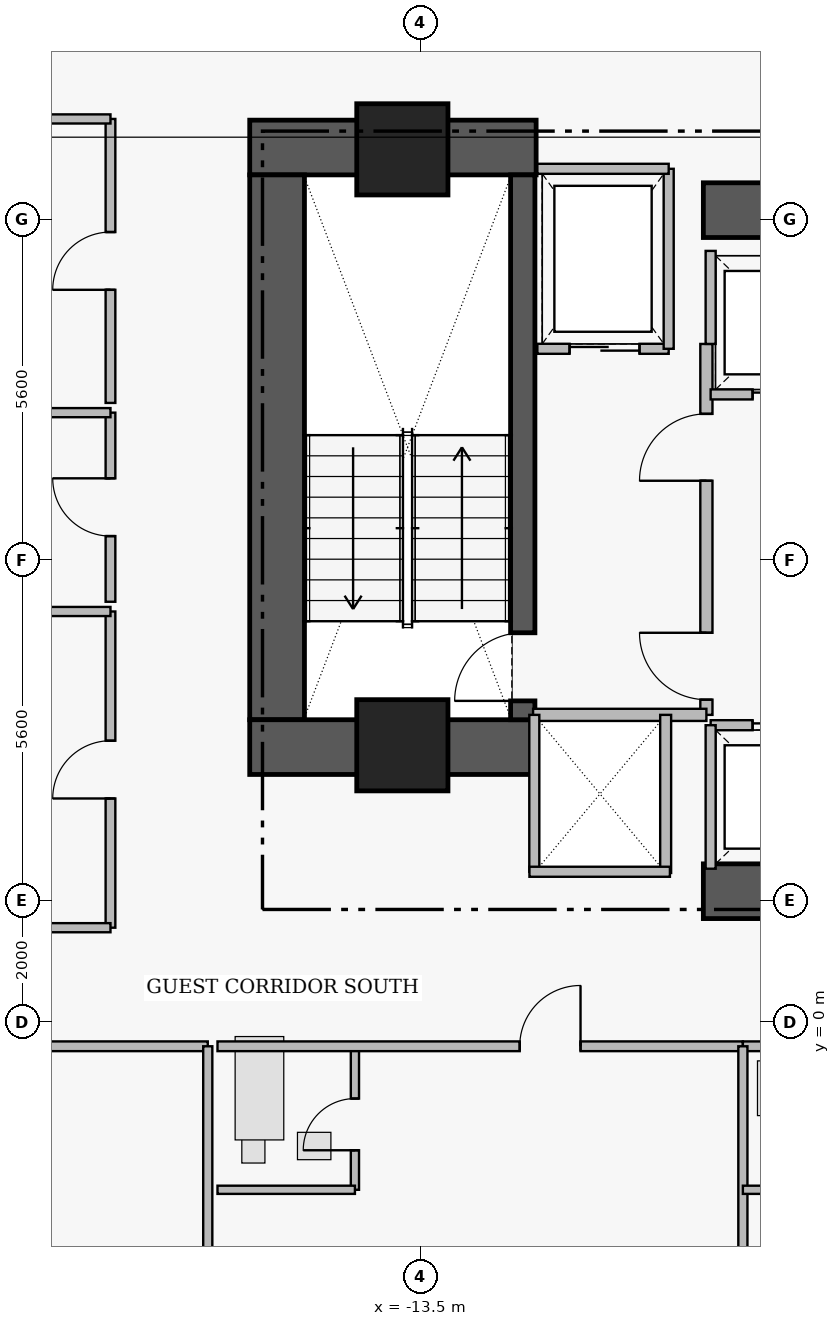
"""IFC4 building model, lengths in metres.
Left out: names, types, materials, properties, quantities, classifications, styles, units other than length and angle.
Written with IfcOpenShell. Run it as: python <this file> out.ifc"""

import sys

from ifc_helpers import new_model, si_unit, direction, frame, frame_2d, origin, origin_2d, place, context, subcontext, project, spatial, rectangle, extrude, element, fill, save


model = new_model("IFC4")
c1 = context("Model", 3, precision=1e-05, world=origin(), true_north=direction((0.0, 1.0)))
c2 = subcontext(c1, "Body", "Model", "MODEL_VIEW")
j1 = project(units=[si_unit("LENGTHUNIT", "METRE"), si_unit("PLANEANGLEUNIT", "RADIAN")], contexts=[c1])
p1 = place(None, origin())
s1 = spatial("IfcSite", under=j1, at=p1, CompositionType="ELEMENT")
p2 = place(p1, origin())
s2 = spatial("IfcBuilding", under=s1, at=p2, CompositionType="ELEMENT")
p3 = place(p2, frame((0.0, 0.0, 38.55)))
s3 = spatial("IfcBuildingStorey", under=s2, at=p3, CompositionType="ELEMENT", Elevation=38.55)
p4 = place(p3, frame((-16.31, 14.38, 0.0), z_axis=(0.0, 0.0, 1.0), x_axis=(1.0, 0.0, 0.0)))
e1 = element("IfcWall", 1, at=p4, inside=s3, PredefinedType="SHEAR", context=c2, shape_type="SweptSolid", body=[
    extrude(rectangle(XDim=4.71, YDim=0.9, at=frame_2d((2.355, 0.0))), origin(), (0.0, 0.0, 1.0), 3.46),
])
p5 = place(p3, frame((-15.86, 4.97, 0.0), z_axis=(0.0, 0.0, 1.0), x_axis=(0.0, 1.0, 0.0)))
e2 = element("IfcWall", 2, at=p5, inside=s3, PredefinedType="SHEAR", context=c2, shape_type="SweptSolid", body=[
    extrude(rectangle(XDim=8.96, YDim=0.9, at=frame_2d((4.48, 0.0))), origin(), (0.0, 0.0, 1.0), 3.46),
])
p6 = place(p3, frame((-16.31, 4.52, 0.0), z_axis=(0.0, 0.0, 1.0), x_axis=(1.0, 0.0, 0.0)))
e3 = element("IfcWall", 3, at=p6, inside=s3, PredefinedType="SHEAR", context=c2, shape_type="SweptSolid", body=[
    extrude(rectangle(XDim=4.71, YDim=0.9, at=frame_2d((2.355, 0.0))), origin(), (0.0, 0.0, 1.0), 3.46),
])
for number, where, z_axis, x_axis in (
    (4, (-8.85, 2.15, 0.0), (0.0, 0.0, 1.0), (1.0, 0.0, 0.0)),
    (5, (-8.85, 13.35, 0.0), (0.0, 0.0, 1.0), (1.0, 0.0, 0.0)),
):
    element("IfcWall", number, at=place(p3, frame(where, z_axis=z_axis, x_axis=x_axis)), inside=s3, PredefinedType="SHEAR", context=c2, shape_type="SweptSolid", body=[
        extrude(rectangle(XDim=7.6, YDim=0.9, at=frame_2d((3.8, 0.0))), origin(), (0.0, 0.0, 1.0), 3.43),
    ])
p7 = place(p3, frame((-11.82, 4.97, 0.0), z_axis=(0.0, 0.0, 1.0), x_axis=(0.0, 1.0, 0.0)))
e6 = element("IfcWall", 6, at=p7, inside=s3, PredefinedType="SHEAR", context=c2, shape_type="SweptSolid", body=[
    extrude(rectangle(XDim=8.96, YDim=0.4, at=frame_2d((4.48, 0.0))), origin(), (0.0, 0.0, 1.0), 3.46),
])
p8 = place(p7, frame((0.31, 0.0, 0.0)))
e7 = element("IfcOpeningElement", 7, at=p8, cuts=e6, PredefinedType="OPENING", context=c2, shape_type="SweptSolid", body=[
    extrude(rectangle(XDim=1.12, YDim=2.22, at=frame_2d((0.56, 1.11))), frame((0.0, 0.21, 0.0), z_axis=(0.0, -1.0, 0.0), x_axis=(1.0, 0.0, 0.0)), (0.0, 0.0, 1.0), 0.42),
])
for number, where, z_axis, x_axis in (
    (8, (-13.8, 14.35, 0.0), (0.0, 0.0, 1.0), (1.0, 0.0, 0.0)),
    (9, (-13.8, 4.55, 0.0), (0.0, 0.0, 1.0), (1.0, 0.0, 0.0)),
):
    element("IfcColumn", number, at=place(p3, frame(where, z_axis=z_axis, x_axis=x_axis)), inside=s3, PredefinedType="COLUMN", context=c2, shape_type="SweptSolid", body=[
        extrude(rectangle(XDim=1.5, YDim=1.5, at=origin_2d()), origin(), (0.0, 0.0, 1.0), 3.65),
    ])
p9 = place(p3, frame((-8.8, 5.05, 0.0), z_axis=(0.0, 0.0, 1.0), x_axis=(0.0, 1.0, 0.0)))
e10 = element("IfcWall", 10, at=p9, inside=s3, PredefinedType="PARTITIONING", context=c2, shape_type="SweptSolid", body=[
    extrude(rectangle(XDim=6.1, YDim=0.2, at=frame_2d((3.05, 0.0))), origin(), (0.0, 0.0, 1.0), 3.43),
])
p10 = place(p9, frame((0.25, 0.0, 0.0)))
e11 = element("IfcOpeningElement", 11, at=p10, cuts=e10, PredefinedType="OPENING", context=c2, shape_type="SweptSolid", body=[
    extrude(rectangle(XDim=1.1, YDim=2.2, at=frame_2d((0.55, 1.1))), frame((0.0, 0.11, 0.0), z_axis=(0.0, -1.0, 0.0), x_axis=(1.0, 0.0, 0.0)), (0.0, 0.0, 1.0), 0.22),
])
p11 = place(p9, frame((3.85, 0.0, 0.0)))
e12 = element("IfcOpeningElement", 12, at=p11, cuts=e10, PredefinedType="OPENING", context=c2, shape_type="SweptSolid", body=[
    extrude(rectangle(XDim=1.1, YDim=2.2, at=frame_2d((0.55, 1.1))), frame((0.0, 0.11, 0.0), z_axis=(0.0, -1.0, 0.0), x_axis=(1.0, 0.0, 0.0)), (0.0, 0.0, 1.0), 0.22),
])
p12 = place(p3, frame((-11.58, 11.07, 0.0), z_axis=(0.0, 0.0, 1.0), x_axis=(1.0, 0.0, 0.0)))
e13 = element("IfcWall", 13, at=p12, inside=s3, PredefinedType="PARTITIONING", context=c2, shape_type="SweptSolid", body=[
    extrude(rectangle(XDim=2.16, YDim=0.165, at=frame_2d((1.08, 0.0))), origin(), (0.0, 0.0, 1.0), 3.43),
])
p13 = place(p12, frame((0.53, 0.0, 0.0)))
e14 = element("IfcOpeningElement", 14, at=p13, cuts=e13, PredefinedType="OPENING", context=c2, shape_type="SweptSolid", body=[
    extrude(rectangle(XDim=1.15, YDim=2.25, at=frame_2d((0.575, 1.125))), frame((0.0, 0.093, 0.0), z_axis=(0.0, -1.0, 0.0), x_axis=(1.0, 0.0, 0.0)), (0.0, 0.0, 1.0), 0.185),
])
p14 = place(p3, frame((-8.73, 4.88, 0.0), z_axis=(0.0, 0.0, 1.0), x_axis=(1.0, 0.0, 0.0)))
e15 = element("IfcWall", 15, at=p14, inside=s3, PredefinedType="PARTITIONING", context=c2, shape_type="SweptSolid", body=[
    extrude(rectangle(XDim=2.48, YDim=0.165, at=frame_2d((1.24, 0.0))), origin(), (0.0, 0.0, 1.0), 3.43),
])
p15 = place(p14, frame((0.69, 0.0, 0.0)))
e16 = element("IfcOpeningElement", 16, at=p15, cuts=e15, PredefinedType="OPENING", context=c2, shape_type="SweptSolid", body=[
    extrude(rectangle(XDim=1.1, YDim=2.25, at=frame_2d((0.55, 1.125))), frame((0.0, 0.093, 0.0), z_axis=(0.0, -1.0, 0.0), x_axis=(1.0, 0.0, 0.0)), (0.0, 0.0, 1.0), 0.185),
])
p16 = place(p3, frame((-8.73, 10.32, 0.0), z_axis=(0.0, 0.0, 1.0), x_axis=(1.0, 0.0, 0.0)))
e17 = element("IfcWall", 17, at=p16, inside=s3, PredefinedType="PARTITIONING", context=c2, shape_type="SweptSolid", body=[
    extrude(rectangle(XDim=2.48, YDim=0.165, at=frame_2d((1.24, 0.0))), origin(), (0.0, 0.0, 1.0), 3.43),
])
p17 = place(p16, frame((0.69, 0.0, 0.0)))
e18 = element("IfcOpeningElement", 18, at=p17, cuts=e17, PredefinedType="OPENING", context=c2, shape_type="SweptSolid", body=[
    extrude(rectangle(XDim=1.1, YDim=2.25, at=frame_2d((0.55, 1.125))), frame((0.0, 0.093, 0.0), z_axis=(0.0, -1.0, 0.0), x_axis=(1.0, 0.0, 0.0)), (0.0, 0.0, 1.0), 0.185),
])
p18 = place(p3, frame((-25.64, -0.4, 0.0), z_axis=(0.0, 0.0, 1.0), x_axis=(1.0, 0.0, 0.0)))
e19 = element("IfcWall", 19, at=p18, inside=s3, PredefinedType="PARTITIONING", context=c2, shape_type="SweptSolid", body=[
    extrude(rectangle(XDim=8.64, YDim=0.16, at=frame_2d((4.32, 0.0))), origin(), (0.0, 0.0, 1.0), 3.43),
])
p19 = place(p18, frame((4.97, 0.0, 0.0)))
e20 = element("IfcOpeningElement", 20, at=p19, cuts=e19, PredefinedType="OPENING", context=c2, shape_type="SweptSolid", body=[
    extrude(rectangle(XDim=1.0, YDim=2.15, at=frame_2d((0.5, 1.075))), frame((0.0, 0.09, 0.0), z_axis=(0.0, -1.0, 0.0), x_axis=(1.0, 0.0, 0.0)), (0.0, 0.0, 1.0), 0.18),
])
p20 = place(p3, frame((-14.58, -2.76, 0.0), z_axis=(0.0, 0.0, 1.0), x_axis=(0.0, 1.0, 0.0)))
e21 = element("IfcWall", 21, at=p20, inside=s3, PredefinedType="PLUMBINGWALL", context=c2, shape_type="SweptSolid", body=[
    extrude(rectangle(XDim=2.36, YDim=0.135, at=frame_2d((1.18, 0.0))), origin(), (0.0, 0.0, 1.0), 3.43),
])
p21 = place(p20, frame((0.65, 0.0, 0.0)))
e22 = element("IfcOpeningElement", 22, at=p21, cuts=e21, PredefinedType="OPENING", context=c2, shape_type="SweptSolid", body=[
    extrude(rectangle(XDim=0.85, YDim=2.1, at=frame_2d((0.425, 1.05))), frame((0.0, 0.077, 0.0), z_axis=(0.0, -1.0, 0.0), x_axis=(1.0, 0.0, 0.0)), (0.0, 0.0, 1.0), 0.155),
])
p22 = place(p3, frame((-16.84, -0.4, 0.0), z_axis=(0.0, 0.0, 1.0), x_axis=(1.0, 0.0, 0.0)))
e23 = element("IfcWall", 23, at=p22, inside=s3, PredefinedType="PARTITIONING", context=c2, shape_type="SweptSolid", body=[
    extrude(rectangle(XDim=8.64, YDim=0.16, at=frame_2d((4.32, 0.0))), origin(), (0.0, 0.0, 1.0), 3.43),
])
p23 = place(p22, frame((4.97, 0.0, 0.0)))
e24 = element("IfcOpeningElement", 24, at=p23, cuts=e23, PredefinedType="OPENING", context=c2, shape_type="SweptSolid", body=[
    extrude(rectangle(XDim=1.0, YDim=2.15, at=frame_2d((0.5, 1.075))), frame((0.0, 0.09, 0.0), z_axis=(0.0, -1.0, 0.0), x_axis=(1.0, 0.0, 0.0)), (0.0, 0.0, 1.0), 0.18),
])
p24 = place(p3, frame((-8.2, -0.4, 0.0), z_axis=(0.0, 0.0, 1.0), x_axis=(1.0, 0.0, 0.0)))
e25 = element("IfcWall", 25, at=p24, inside=s3, PredefinedType="PARTITIONING", context=c2, shape_type="SweptSolid", body=[
    extrude(rectangle(XDim=5.22, YDim=0.16, at=frame_2d((2.61, 0.0))), origin(), (0.0, 0.0, 1.0), 3.43),
])
p25 = place(p24, frame((3.26, 0.0, 0.0)))
e26 = element("IfcOpeningElement", 26, at=p25, cuts=e25, PredefinedType="OPENING", context=c2, shape_type="SweptSolid", body=[
    extrude(rectangle(XDim=1.0, YDim=2.15, at=frame_2d((0.5, 1.075))), frame((0.0, 0.09, 0.0), z_axis=(0.0, -1.0, 0.0), x_axis=(1.0, 0.0, 0.0)), (0.0, 0.0, 1.0), 0.18),
])
p26 = place(p3, frame((-18.6, 1.55, 0.0), z_axis=(0.0, 0.0, 1.0), x_axis=(0.0, 1.0, 0.0)))
e27 = element("IfcWall", 27, at=p26, inside=s3, PredefinedType="PARTITIONING", context=c2, shape_type="SweptSolid", body=[
    extrude(rectangle(XDim=5.2, YDim=0.16, at=frame_2d((2.6, 0.0))), origin(), (0.0, 0.0, 1.0), 3.43),
])
p27 = place(p26, frame((2.125, 0.0, 0.0)))
e28 = element("IfcOpeningElement", 28, at=p27, cuts=e27, PredefinedType="OPENING", context=c2, shape_type="SweptSolid", body=[
    extrude(rectangle(XDim=0.95, YDim=2.15, at=frame_2d((0.475, 1.075))), frame((0.0, 0.09, 0.0), z_axis=(0.0, -1.0, 0.0), x_axis=(1.0, 0.0, 0.0)), (0.0, 0.0, 1.0), 0.18),
])
p28 = place(p3, frame((-18.6, 6.91, 0.0), z_axis=(0.0, 0.0, 1.0), x_axis=(0.0, 1.0, 0.0)))
e29 = element("IfcWall", 29, at=p28, inside=s3, PredefinedType="PARTITIONING", context=c2, shape_type="SweptSolid", body=[
    extrude(rectangle(XDim=3.11, YDim=0.16, at=frame_2d((1.555, 0.0))), origin(), (0.0, 0.0, 1.0), 3.43),
])
p29 = place(p28, frame((1.08, 0.0, 0.0)))
e30 = element("IfcOpeningElement", 30, at=p29, cuts=e29, PredefinedType="OPENING", context=c2, shape_type="SweptSolid", body=[
    extrude(rectangle(XDim=0.95, YDim=2.15, at=frame_2d((0.475, 1.075))), frame((0.0, 0.09, 0.0), z_axis=(0.0, -1.0, 0.0), x_axis=(1.0, 0.0, 0.0)), (0.0, 0.0, 1.0), 0.18),
])
p30 = place(p3, frame((-18.6, 10.18, 0.0), z_axis=(0.0, 0.0, 1.0), x_axis=(0.0, 1.0, 0.0)))
e31 = element("IfcWall", 31, at=p30, inside=s3, PredefinedType="PARTITIONING", context=c2, shape_type="SweptSolid", body=[
    extrude(rectangle(XDim=4.67, YDim=0.16, at=frame_2d((2.335, 0.0))), origin(), (0.0, 0.0, 1.0), 3.43),
])
p31 = place(p30, frame((1.86, 0.0, 0.0)))
e32 = element("IfcOpeningElement", 32, at=p31, cuts=e31, PredefinedType="OPENING", context=c2, shape_type="SweptSolid", body=[
    extrude(rectangle(XDim=0.95, YDim=2.15, at=frame_2d((0.475, 1.075))), frame((0.0, 0.09, 0.0), z_axis=(0.0, -1.0, 0.0), x_axis=(1.0, 0.0, 0.0)), (0.0, 0.0, 1.0), 0.18),
])
p32 = place(p3, frame((-11.65, 5.05, 0.0), z_axis=(0.0, 0.0, 1.0), x_axis=(1.0, 0.0, 0.0)))
e33 = element("IfcWall", 33, at=p32, inside=s3, PredefinedType="PARTITIONING", context=c2, shape_type="SweptSolid", body=[
    extrude(rectangle(XDim=2.85, YDim=0.2, at=frame_2d((1.425, 0.0))), origin(), (0.0, 0.0, 1.0), 3.43),
])
p33 = place(p3, frame((-9.42, 11.07, 0.0), z_axis=(0.0, 0.0, 1.0), x_axis=(0.0, 1.0, 0.0)))
e34 = element("IfcWall", 34, at=p33, inside=s3, PredefinedType="PARTITIONING", context=c2, shape_type="SweptSolid", body=[
    extrude(rectangle(XDim=2.96, YDim=0.165, at=frame_2d((1.48, 0.0))), origin(), (0.0, 0.0, 1.0), 3.43),
])
p34 = place(p3, frame((-11.58, 14.03, 0.0), z_axis=(0.0, 0.0, 1.0), x_axis=(1.0, 0.0, 0.0)))
e35 = element("IfcWall", 35, at=p34, inside=s3, PredefinedType="PARTITIONING", context=c2, shape_type="SweptSolid", body=[
    extrude(rectangle(XDim=2.16, YDim=0.165, at=frame_2d((1.08, 0.0))), origin(), (0.0, 0.0, 1.0), 3.43),
])
p35 = place(p3, frame((-8.73, 2.52, 0.0), z_axis=(0.0, 0.0, 1.0), x_axis=(0.0, 1.0, 0.0)))
e36 = element("IfcWall", 36, at=p35, inside=s3, PredefinedType="PARTITIONING", context=c2, shape_type="SweptSolid", body=[
    extrude(rectangle(XDim=2.36, YDim=0.165, at=frame_2d((1.18, 0.0))), origin(), (0.0, 0.0, 1.0), 3.43),
])
p36 = place(p3, frame((-8.73, 11.15, 0.0), z_axis=(0.0, 0.0, 1.0), x_axis=(0.0, 1.0, 0.0)))
e37 = element("IfcWall", 37, at=p36, inside=s3, PredefinedType="PARTITIONING", context=c2, shape_type="SweptSolid", body=[
    extrude(rectangle(XDim=1.53, YDim=0.165, at=frame_2d((0.765, 0.0))), origin(), (0.0, 0.0, 1.0), 3.43),
])
p37 = place(p3, frame((-9.47, 2.45, 0.0), z_axis=(0.0, 0.0, 1.0), x_axis=(0.0, 1.0, 0.0)))
e38 = element("IfcWall", 38, at=p37, inside=s3, PredefinedType="PARTITIONING", context=c2, shape_type="SweptSolid", body=[
    extrude(rectangle(XDim=2.6, YDim=0.18, at=frame_2d((1.3, 0.0))), origin(), (0.0, 0.0, 1.0), 3.43),
])
p38 = place(p3, frame((-11.63, 2.47, 0.0), z_axis=(0.0, 0.0, 1.0), x_axis=(0.0, 1.0, 0.0)))
e39 = element("IfcWall", 39, at=p38, inside=s3, PredefinedType="PARTITIONING", context=c2, shape_type="SweptSolid", body=[
    extrude(rectangle(XDim=2.58, YDim=0.165, at=frame_2d((1.29, 0.0))), origin(), (0.0, 0.0, 1.0), 3.43),
])
p39 = place(p3, frame((-11.71, 2.47, 0.0), z_axis=(0.0, 0.0, 1.0), x_axis=(1.0, 0.0, 0.0)))
e40 = element("IfcWall", 40, at=p39, inside=s3, PredefinedType="PARTITIONING", context=c2, shape_type="SweptSolid", body=[
    extrude(rectangle(XDim=2.31, YDim=0.165, at=frame_2d((1.155, 0.0))), origin(), (0.0, 0.0, 1.0), 2.03),
])
p40 = place(p3, frame((-17.0, -23.02, 0.0), z_axis=(0.0, 0.0, 1.0), x_axis=(0.0, 1.0, 0.0)))
e41 = element("IfcWall", 41, at=p40, inside=s3, PredefinedType="PARTITIONING", context=c2, shape_type="SweptSolid", body=[
    extrude(rectangle(XDim=22.62, YDim=0.15, at=frame_2d((11.31, 0.0))), origin(), (0.0, 0.0, 1.0), 3.43),
])
p41 = place(p3, frame((-16.84, -2.76, 0.0), z_axis=(0.0, 0.0, 1.0), x_axis=(1.0, 0.0, 0.0)))
e42 = element("IfcWall", 42, at=p41, inside=s3, PredefinedType="PLUMBINGWALL", context=c2, shape_type="SweptSolid", body=[
    extrude(rectangle(XDim=2.26, YDim=0.135, at=frame_2d((1.13, 0.0))), origin(), (0.0, 0.0, 1.0), 3.43),
])
p42 = place(p3, frame((-8.2, -23.02, 0.0), z_axis=(0.0, 0.0, 1.0), x_axis=(0.0, 1.0, 0.0)))
e43 = element("IfcWall", 43, at=p42, inside=s3, PredefinedType="PARTITIONING", context=c2, shape_type="SweptSolid", body=[
    extrude(rectangle(XDim=22.62, YDim=0.15, at=frame_2d((11.31, 0.0))), origin(), (0.0, 0.0, 1.0), 3.43),
])
p43 = place(p3, frame((-8.2, -2.76, 0.0), z_axis=(0.0, 0.0, 1.0), x_axis=(1.0, 0.0, 0.0)))
e44 = element("IfcWall", 44, at=p43, inside=s3, PredefinedType="PLUMBINGWALL", context=c2, shape_type="SweptSolid", body=[
    extrude(rectangle(XDim=2.26, YDim=0.135, at=frame_2d((1.13, 0.0))), origin(), (0.0, 0.0, 1.0), 3.43),
])
p44 = place(p3, frame((-27.605, 1.55, 0.0), z_axis=(0.0, 0.0, 1.0), x_axis=(1.0, 0.0, 0.0)))
e45 = element("IfcWall", 45, at=p44, inside=s3, PredefinedType="PARTITIONING", context=c2, shape_type="SweptSolid", body=[
    extrude(rectangle(XDim=9.005, YDim=0.15, at=frame_2d((4.503, 0.0))), origin(), (0.0, 0.0, 1.0), 3.43),
])
for number, where, z_axis, x_axis in (
    (46, (-25.64, 6.75, 0.0), (0.0, 0.0, 1.0), (1.0, 0.0, 0.0)),
    (47, (-25.64, 10.02, 0.0), (0.0, 0.0, 1.0), (1.0, 0.0, 0.0)),
    (48, (-25.64, 14.85, 0.0), (0.0, 0.0, 1.0), (1.0, 0.0, 0.0)),
):
    element("IfcWall", number, at=place(p3, frame(where, z_axis=z_axis, x_axis=x_axis)), inside=s3, PredefinedType="PARTITIONING", context=c2, shape_type="SweptSolid", body=[
        extrude(rectangle(XDim=7.04, YDim=0.15, at=frame_2d((3.52, 0.0))), origin(), (0.0, 0.0, 1.0), 3.43),
    ])
p45 = place(p8, origin())
e49 = element("IfcDoor", 49, at=p45, inside=s3, OperationType="SINGLE_SWING_LEFT", PredefinedType="DOOR", context=c2, shape_type="SweptSolid", body=[
    extrude(rectangle(XDim=1.12, YDim=2.22, at=frame_2d((0.56, 1.11))), frame((0.0, 0.025, 0.0), z_axis=(0.0, -1.0, 0.0), x_axis=(1.0, 0.0, 0.0)), (0.0, 0.0, 1.0), 0.05),
])
fill(e7, e49)
p46 = place(p10, origin())
e50 = element("IfcDoor", 50, at=p46, inside=s3, OperationType="SINGLE_SWING_RIGHT", PredefinedType="DOOR", context=c2, shape_type="SweptSolid", body=[
    extrude(rectangle(XDim=1.1, YDim=2.2, at=frame_2d((0.55, 1.1))), frame((0.0, 0.025, 0.0), z_axis=(0.0, -1.0, 0.0), x_axis=(1.0, 0.0, 0.0)), (0.0, 0.0, 1.0), 0.05),
])
fill(e11, e50)
p47 = place(p11, origin())
e51 = element("IfcDoor", 51, at=p47, inside=s3, OperationType="SINGLE_SWING_LEFT", PredefinedType="DOOR", context=c2, shape_type="SweptSolid", body=[
    extrude(rectangle(XDim=1.1, YDim=2.2, at=frame_2d((0.55, 1.1))), frame((0.0, 0.025, 0.0), z_axis=(0.0, -1.0, 0.0), x_axis=(1.0, 0.0, 0.0)), (0.0, 0.0, 1.0), 0.05),
])
fill(e12, e51)
p48 = place(p13, origin())
e52 = element("IfcDoor", 52, at=p48, inside=s3, OperationType="SLIDING_TO_LEFT", PredefinedType="DOOR", context=c2, shape_type="SweptSolid", body=[
    extrude(rectangle(XDim=1.15, YDim=2.25, at=frame_2d((0.575, 1.125))), frame((0.0, 0.025, 0.0), z_axis=(0.0, -1.0, 0.0), x_axis=(1.0, 0.0, 0.0)), (0.0, 0.0, 1.0), 0.05),
])
fill(e14, e52)
p49 = place(p15, origin())
e53 = element("IfcDoor", 53, at=p49, inside=s3, OperationType="SLIDING_TO_LEFT", PredefinedType="DOOR", context=c2, shape_type="SweptSolid", body=[
    extrude(rectangle(XDim=1.1, YDim=2.25, at=frame_2d((0.55, 1.125))), frame((0.0, 0.025, 0.0), z_axis=(0.0, -1.0, 0.0), x_axis=(1.0, 0.0, 0.0)), (0.0, 0.0, 1.0), 0.05),
])
fill(e16, e53)
p50 = place(p17, origin())
e54 = element("IfcDoor", 54, at=p50, inside=s3, OperationType="SLIDING_TO_LEFT", PredefinedType="DOOR", context=c2, shape_type="SweptSolid", body=[
    extrude(rectangle(XDim=1.1, YDim=2.25, at=frame_2d((0.55, 1.125))), frame((0.0, 0.025, 0.0), z_axis=(0.0, -1.0, 0.0), x_axis=(1.0, 0.0, 0.0)), (0.0, 0.0, 1.0), 0.05),
])
fill(e18, e54)
p51 = place(p21, origin())
e55 = element("IfcDoor", 55, at=p51, inside=s3, OperationType="SINGLE_SWING_LEFT", PredefinedType="DOOR", context=c2, shape_type="SweptSolid", body=[
    extrude(rectangle(XDim=0.85, YDim=2.1, at=frame_2d((0.425, 1.05))), frame((0.0, 0.025, 0.0), z_axis=(0.0, -1.0, 0.0), x_axis=(1.0, 0.0, 0.0)), (0.0, 0.0, 1.0), 0.05),
])
fill(e22, e55)
p52 = place(p23, origin())
e56 = element("IfcDoor", 56, at=p52, inside=s3, OperationType="SINGLE_SWING_RIGHT", PredefinedType="DOOR", context=c2, shape_type="SweptSolid", body=[
    extrude(rectangle(XDim=1.0, YDim=2.15, at=frame_2d((0.5, 1.075))), frame((0.0, 0.025, 0.0), z_axis=(0.0, -1.0, 0.0), x_axis=(1.0, 0.0, 0.0)), (0.0, 0.0, 1.0), 0.05),
])
fill(e24, e56)
p53 = place(p27, origin())
e57 = element("IfcDoor", 57, at=p53, inside=s3, OperationType="SINGLE_SWING_LEFT", PredefinedType="DOOR", context=c2, shape_type="SweptSolid", body=[
    extrude(rectangle(XDim=0.95, YDim=2.15, at=frame_2d((0.475, 1.075))), frame((0.0, 0.025, 0.0), z_axis=(0.0, -1.0, 0.0), x_axis=(1.0, 0.0, 0.0)), (0.0, 0.0, 1.0), 0.05),
])
fill(e28, e57)
p54 = place(p29, origin())
e58 = element("IfcDoor", 58, at=p54, inside=s3, OperationType="SINGLE_SWING_RIGHT", PredefinedType="DOOR", context=c2, shape_type="SweptSolid", body=[
    extrude(rectangle(XDim=0.95, YDim=2.15, at=frame_2d((0.475, 1.075))), frame((0.0, 0.025, 0.0), z_axis=(0.0, -1.0, 0.0), x_axis=(1.0, 0.0, 0.0)), (0.0, 0.0, 1.0), 0.05),
])
fill(e30, e58)
p55 = place(p31, origin())
e59 = element("IfcDoor", 59, at=p55, inside=s3, OperationType="SINGLE_SWING_LEFT", PredefinedType="DOOR", context=c2, shape_type="SweptSolid", body=[
    extrude(rectangle(XDim=0.95, YDim=2.15, at=frame_2d((0.475, 1.075))), frame((0.0, 0.025, 0.0), z_axis=(0.0, -1.0, 0.0), x_axis=(1.0, 0.0, 0.0)), (0.0, 0.0, 1.0), 0.05),
])
fill(e32, e59)
save(model, sys.argv[1])
